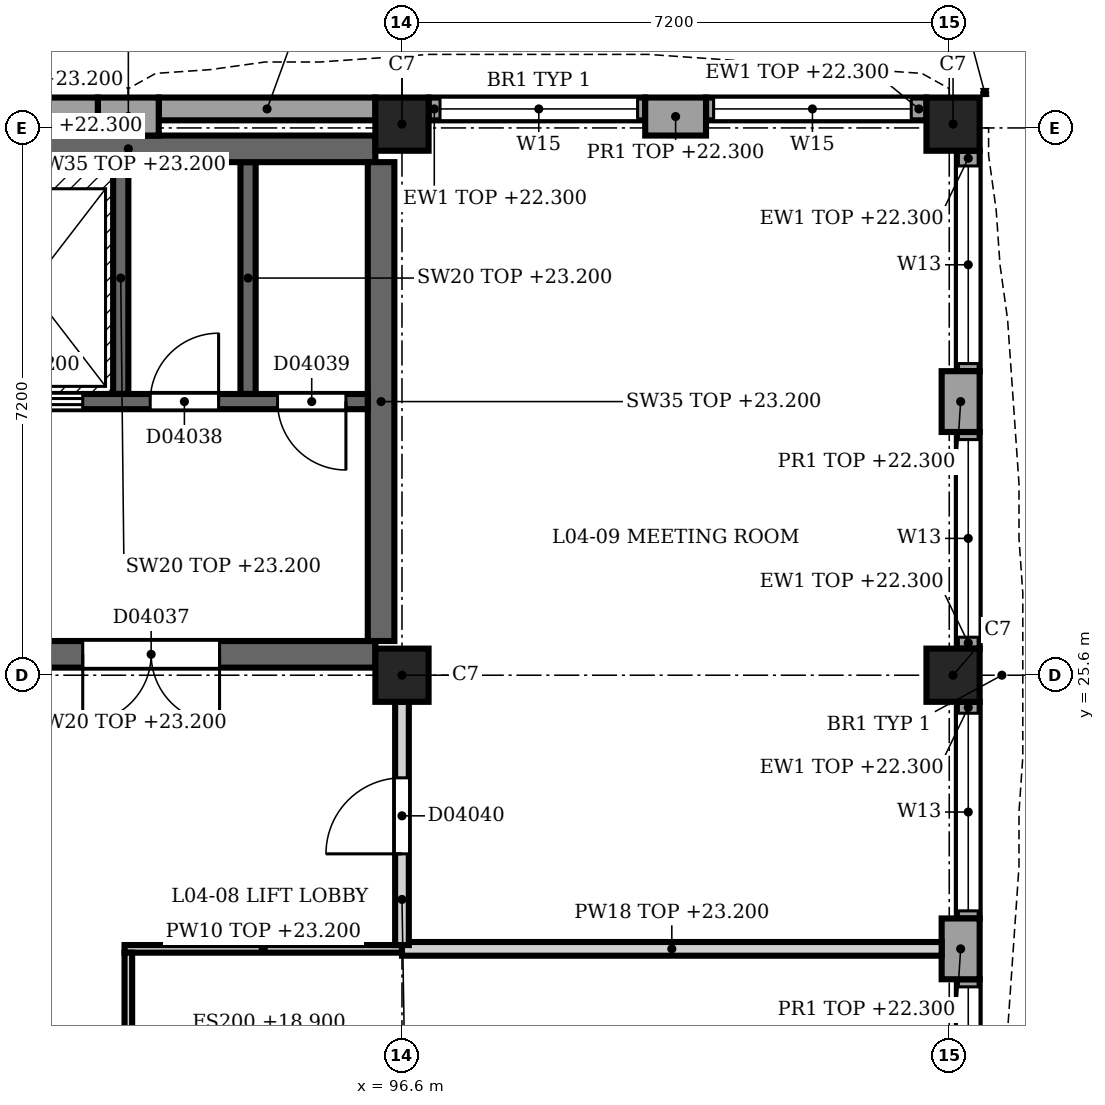
"""IFC4 building model, lengths in metres.
Left out: names, types, materials, properties, quantities, classifications, styles, units other than length and angle.
Written with IfcOpenShell. Run it as: python <this file> out.ifc"""

import sys

from ifc_helpers import new_model, si_unit, direction, frame, frame_2d, origin, origin_2d, place, context, subcontext, project, spatial, rectangle, extrude, element, fill, save


model = new_model("IFC4")
c1 = context("Model", 3, precision=1e-05, world=origin(), true_north=direction((0.0, 1.0)))
c2 = subcontext(c1, "Body", "Model", "MODEL_VIEW")
j1 = project(units=[si_unit("LENGTHUNIT", "METRE"), si_unit("PLANEANGLEUNIT", "RADIAN")], contexts=[c1])
p1 = place(None, origin())
s1 = spatial("IfcSite", under=j1, at=p1, CompositionType="ELEMENT")
p2 = place(p1, origin())
s2 = spatial("IfcBuilding", under=s1, at=p2, CompositionType="ELEMENT")
p3 = place(p2, frame((0.0, 0.0, 18.9)))
s3 = spatial("IfcBuildingStorey", under=s2, at=p3, CompositionType="ELEMENT", Elevation=18.9)
for number, where, z_axis, x_axis in (
    (1, (96.6, 25.6, 0.0), (0.0, 0.0, 1.0), (1.0, 0.0, 0.0)),
    (2, (96.6, 32.85, 0.0), (0.0, 0.0, 1.0), (1.0, 0.0, 0.0)),
    (3, (103.85, 25.6, 0.0), (0.0, 0.0, 1.0), (1.0, 0.0, 0.0)),
    (4, (103.85, 32.85, 0.0), (0.0, 0.0, 1.0), (1.0, 0.0, 0.0)),
):
    element("IfcColumn", number, at=place(p3, frame(where, z_axis=z_axis, x_axis=x_axis)), inside=s3, PredefinedType="COLUMN", context=c2, shape_type="SweptSolid", body=[
        extrude(rectangle(XDim=0.7, YDim=0.7, at=origin_2d()), origin(), (0.0, 0.0, 1.0), 4.5),
    ])
p4 = place(p3, frame((92.6, 32.95, 0.0), z_axis=(0.0, 0.0, 1.0), x_axis=(1.0, 0.0, 0.0)))
e5 = element("IfcWall", 5, at=p4, inside=s3, PredefinedType="SOLIDWALL", context=c2, shape_type="SweptSolid", body=[
    extrude(rectangle(XDim=0.8, YDim=0.5, at=frame_2d((0.4, 0.0))), origin(), (0.0, 0.0, 1.0), 3.4),
])
p5 = place(p3, frame((99.8, 32.95, 0.0), z_axis=(0.0, 0.0, 1.0), x_axis=(1.0, 0.0, 0.0)))
e6 = element("IfcWall", 6, at=p5, inside=s3, PredefinedType="SOLIDWALL", context=c2, shape_type="SweptSolid", body=[
    extrude(rectangle(XDim=0.8, YDim=0.5, at=frame_2d((0.4, 0.0))), origin(), (0.0, 0.0, 1.0), 3.4),
])
for number, where, z_axis, x_axis in (
    (7, (89.75, 33.05, 0.0), (0.0, 0.0, 1.0), (1.0, 0.0, 0.0)),
    (8, (93.4, 33.05, 0.0), (0.0, 0.0, 1.0), (1.0, 0.0, 0.0)),
):
    element("IfcWall", number, at=place(p3, frame(where, z_axis=z_axis, x_axis=x_axis)), inside=s3, PredefinedType="SOLIDWALL", context=c2, shape_type="SweptSolid", body=[
        extrude(rectangle(XDim=2.85, YDim=0.3, at=frame_2d((1.425, 0.0))), origin(), (0.0, 0.0, 1.0), 3.4),
    ])
p6 = place(p3, frame((96.95, 33.05, 0.0), z_axis=(0.0, 0.0, 1.0), x_axis=(1.0, 0.0, 0.0)))
e9 = element("IfcWall", 9, at=p6, inside=s3, PredefinedType="SOLIDWALL", context=c2, shape_type="SweptSolid", body=[
    extrude(rectangle(XDim=2.85, YDim=0.3, at=frame_2d((1.425, 0.0))), origin(), (0.0, 0.0, 1.0), 3.4),
])
p7 = place(p6, frame((0.15, 0.0, 1.0)))
e10 = element("IfcOpeningElement", 10, at=p7, cuts=e9, PredefinedType="OPENING", context=c2, shape_type="SweptSolid", body=[
    extrude(rectangle(XDim=2.6, YDim=2.0, at=frame_2d((1.3, 1.0))), frame((0.0, 0.16, 0.0), z_axis=(0.0, -1.0, 0.0), x_axis=(1.0, 0.0, 0.0)), (0.0, 0.0, 1.0), 0.32),
])
p8 = place(p3, frame((100.6, 33.05, 0.0), z_axis=(0.0, 0.0, 1.0), x_axis=(1.0, 0.0, 0.0)))
e11 = element("IfcWall", 11, at=p8, inside=s3, PredefinedType="SOLIDWALL", context=c2, shape_type="SweptSolid", body=[
    extrude(rectangle(XDim=2.9, YDim=0.3, at=frame_2d((1.45, 0.0))), origin(), (0.0, 0.0, 1.0), 3.4),
])
p9 = place(p8, frame((0.1, 0.0, 1.0)))
e12 = element("IfcOpeningElement", 12, at=p9, cuts=e11, PredefinedType="OPENING", context=c2, shape_type="SweptSolid", body=[
    extrude(rectangle(XDim=2.6, YDim=2.0, at=frame_2d((1.3, 1.0))), frame((0.0, 0.16, 0.0), z_axis=(0.0, -1.0, 0.0), x_axis=(1.0, 0.0, 0.0)), (0.0, 0.0, 1.0), 0.32),
])
p10 = place(p3, frame((103.95, 29.6, 0.0), z_axis=(0.0, 0.0, 1.0), x_axis=(0.0, -1.0, 0.0)))
e13 = element("IfcWall", 13, at=p10, inside=s3, PredefinedType="SOLIDWALL", context=c2, shape_type="SweptSolid", body=[
    extrude(rectangle(XDim=0.8, YDim=0.5, at=frame_2d((0.4, 0.0))), origin(), (0.0, 0.0, 1.0), 3.4),
])
p11 = place(p3, frame((103.95, 22.4, 0.0), z_axis=(0.0, 0.0, 1.0), x_axis=(0.0, -1.0, 0.0)))
e14 = element("IfcWall", 14, at=p11, inside=s3, PredefinedType="SOLIDWALL", context=c2, shape_type="SweptSolid", body=[
    extrude(rectangle(XDim=0.8, YDim=0.5, at=frame_2d((0.4, 0.0))), origin(), (0.0, 0.0, 1.0), 3.4),
])
p12 = place(p3, frame((104.05, 32.5, 0.0), z_axis=(0.0, 0.0, 1.0), x_axis=(0.0, -1.0, 0.0)))
e15 = element("IfcWall", 15, at=p12, inside=s3, PredefinedType="SOLIDWALL", context=c2, shape_type="SweptSolid", body=[
    extrude(rectangle(XDim=2.9, YDim=0.3, at=frame_2d((1.45, 0.0))), origin(), (0.0, 0.0, 1.0), 3.4),
])
p13 = place(p12, frame((0.2, 0.0, 0.9)))
e16 = element("IfcOpeningElement", 16, at=p13, cuts=e15, PredefinedType="OPENING", context=c2, shape_type="SweptSolid", body=[
    extrude(rectangle(XDim=2.6, YDim=2.2, at=frame_2d((1.3, 1.1))), frame((0.0, 0.16, 0.0), z_axis=(0.0, -1.0, 0.0), x_axis=(1.0, 0.0, 0.0)), (0.0, 0.0, 1.0), 0.32),
])
p14 = place(p3, frame((104.05, 28.8, 0.0), z_axis=(0.0, 0.0, 1.0), x_axis=(0.0, -1.0, 0.0)))
e17 = element("IfcWall", 17, at=p14, inside=s3, PredefinedType="SOLIDWALL", context=c2, shape_type="SweptSolid", body=[
    extrude(rectangle(XDim=2.85, YDim=0.3, at=frame_2d((1.425, 0.0))), origin(), (0.0, 0.0, 1.0), 3.4),
])
p15 = place(p14, frame((0.1, 0.0, 0.9)))
e18 = element("IfcOpeningElement", 18, at=p15, cuts=e17, PredefinedType="OPENING", context=c2, shape_type="SweptSolid", body=[
    extrude(rectangle(XDim=2.6, YDim=2.2, at=frame_2d((1.3, 1.1))), frame((0.0, 0.16, 0.0), z_axis=(0.0, -1.0, 0.0), x_axis=(1.0, 0.0, 0.0)), (0.0, 0.0, 1.0), 0.32),
])
p16 = place(p3, frame((104.05, 25.25, 0.0), z_axis=(0.0, 0.0, 1.0), x_axis=(0.0, -1.0, 0.0)))
e19 = element("IfcWall", 19, at=p16, inside=s3, PredefinedType="SOLIDWALL", context=c2, shape_type="SweptSolid", body=[
    extrude(rectangle(XDim=2.85, YDim=0.3, at=frame_2d((1.425, 0.0))), origin(), (0.0, 0.0, 1.0), 3.4),
])
p17 = place(p16, frame((0.15, 0.0, 0.9)))
e20 = element("IfcOpeningElement", 20, at=p17, cuts=e19, PredefinedType="OPENING", context=c2, shape_type="SweptSolid", body=[
    extrude(rectangle(XDim=2.6, YDim=2.2, at=frame_2d((1.3, 1.1))), frame((0.0, 0.16, 0.0), z_axis=(0.0, -1.0, 0.0), x_axis=(1.0, 0.0, 0.0)), (0.0, 0.0, 1.0), 0.32),
])
p18 = place(p3, frame((104.05, 21.6, 0.0), z_axis=(0.0, 0.0, 1.0), x_axis=(0.0, -1.0, 0.0)))
e21 = element("IfcWall", 21, at=p18, inside=s3, PredefinedType="SOLIDWALL", context=c2, shape_type="SweptSolid", body=[
    extrude(rectangle(XDim=2.85, YDim=0.3, at=frame_2d((1.425, 0.0))), origin(), (0.0, 0.0, 1.0), 3.4),
])
p19 = place(p18, frame((0.1, 0.0, 0.9)))
e22 = element("IfcOpeningElement", 22, at=p19, cuts=e21, PredefinedType="OPENING", context=c2, shape_type="SweptSolid", body=[
    extrude(rectangle(XDim=2.6, YDim=2.2, at=frame_2d((1.3, 1.1))), frame((0.0, 0.16, 0.0), z_axis=(0.0, -1.0, 0.0), x_axis=(1.0, 0.0, 0.0)), (0.0, 0.0, 1.0), 0.32),
])
p20 = place(p3, frame((89.75, 25.875, 0.0), z_axis=(0.0, 0.0, 1.0), x_axis=(1.0, 0.0, 0.0)))
e23 = element("IfcWall", 23, at=p20, inside=s3, PredefinedType="SHEAR", context=c2, shape_type="SweptSolid", body=[
    extrude(rectangle(XDim=6.5, YDim=0.35, at=frame_2d((3.25, 0.0))), origin(), (0.0, 0.0, 1.0), 4.3),
])
p21 = place(p20, frame((2.65, 0.0, 0.0)))
e24 = element("IfcOpeningElement", 24, at=p21, cuts=e23, PredefinedType="OPENING", context=c2, shape_type="SweptSolid", body=[
    extrude(rectangle(XDim=1.8, YDim=2.1, at=frame_2d((0.9, 1.05))), frame((0.0, 0.185, 0.0), z_axis=(0.0, -1.0, 0.0), x_axis=(1.0, 0.0, 0.0)), (0.0, 0.0, 1.0), 0.37),
])
p22 = place(p3, frame((89.75, 32.525, 0.0), z_axis=(0.0, 0.0, 1.0), x_axis=(1.0, 0.0, 0.0)))
e25 = element("IfcWall", 25, at=p22, inside=s3, PredefinedType="SHEAR", context=c2, shape_type="SweptSolid", body=[
    extrude(rectangle(XDim=6.5, YDim=0.35, at=frame_2d((3.25, 0.0))), origin(), (0.0, 0.0, 1.0), 4.3),
])
p23 = place(p3, frame((96.325, 26.05, 0.0), z_axis=(0.0, 0.0, 1.0), x_axis=(0.0, 1.0, 0.0)))
e26 = element("IfcWall", 26, at=p23, inside=s3, PredefinedType="SHEAR", context=c2, shape_type="SweptSolid", body=[
    extrude(rectangle(XDim=6.3, YDim=0.35, at=frame_2d((3.15, 0.0))), origin(), (0.0, 0.0, 1.0), 4.3),
])
p24 = place(p3, frame((96.15, 29.2, 0.0), z_axis=(0.0, 0.0, 1.0), x_axis=(-1.0, 0.0, 0.0)))
e27 = element("IfcWall", 27, at=p24, inside=s3, PredefinedType="SHEAR", context=c2, shape_type="SweptSolid", body=[
    extrude(rectangle(XDim=10.35, YDim=0.2, at=frame_2d((5.175, 0.0))), origin(), (0.0, 0.0, 1.0), 4.3),
])
p25 = place(p24, frame((8.8, 0.0, 0.0)))
e28 = element("IfcOpeningElement", 28, at=p25, cuts=e27, PredefinedType="OPENING", context=c2, shape_type="SweptSolid", body=[
    extrude(rectangle(XDim=1.1, YDim=2.1, at=frame_2d((0.55, 1.05))), frame((0.0, 0.11, 0.0), z_axis=(0.0, -1.0, 0.0), x_axis=(1.0, 0.0, 0.0)), (0.0, 0.0, 1.0), 0.22),
])
p26 = place(p24, frame((6.6, 0.0, 0.0)))
e29 = element("IfcOpeningElement", 29, at=p26, cuts=e27, PredefinedType="OPENING", context=c2, shape_type="SweptSolid", body=[
    extrude(rectangle(XDim=1.1, YDim=2.1, at=frame_2d((0.55, 1.05))), frame((0.0, 0.11, 0.0), z_axis=(0.0, -1.0, 0.0), x_axis=(1.0, 0.0, 0.0)), (0.0, 0.0, 1.0), 0.22),
])
p27 = place(p24, frame((3.75, 0.0, 0.0)))
e30 = element("IfcOpeningElement", 30, at=p27, cuts=e27, PredefinedType="OPENING", context=c2, shape_type="SweptSolid", body=[
    extrude(rectangle(XDim=1.4, YDim=2.1, at=frame_2d((0.7, 1.05))), frame((0.0, 0.11, 0.0), z_axis=(0.0, -1.0, 0.0), x_axis=(1.0, 0.0, 0.0)), (0.0, 0.0, 1.0), 0.22),
])
p28 = place(p24, frame((1.962, 0.0, 0.0)))
e31 = element("IfcOpeningElement", 31, at=p28, cuts=e27, PredefinedType="OPENING", context=c2, shape_type="SweptSolid", body=[
    extrude(rectangle(XDim=0.9, YDim=2.1, at=frame_2d((0.45, 1.05))), frame((0.0, 0.11, 0.0), z_axis=(0.0, -1.0, 0.0), x_axis=(1.0, 0.0, 0.0)), (0.0, 0.0, 1.0), 0.22),
])
p29 = place(p24, frame((0.288, 0.0, 0.0)))
e32 = element("IfcOpeningElement", 32, at=p29, cuts=e27, PredefinedType="OPENING", context=c2, shape_type="SweptSolid", body=[
    extrude(rectangle(XDim=0.9, YDim=2.1, at=frame_2d((0.45, 1.05))), frame((0.0, 0.11, 0.0), z_axis=(0.0, -1.0, 0.0), x_axis=(1.0, 0.0, 0.0)), (0.0, 0.0, 1.0), 0.22),
])
for number, where, z_axis, x_axis in (
    (33, (92.9, 29.3, 0.0), (0.0, 0.0, 1.0), (0.0, 1.0, 0.0)),
    (34, (94.575, 29.3, 0.0), (0.0, 0.0, 1.0), (0.0, 1.0, 0.0)),
):
    element("IfcWall", number, at=place(p3, frame(where, z_axis=z_axis, x_axis=x_axis)), inside=s3, PredefinedType="SHEAR", context=c2, shape_type="SweptSolid", body=[
        extrude(rectangle(XDim=3.05, YDim=0.2, at=frame_2d((1.525, 0.0))), origin(), (0.0, 0.0, 1.0), 4.3),
    ])
p30 = place(p3, frame((92.95, 22.0, 0.0), z_axis=(0.0, 0.0, 1.0), x_axis=(1.0, 0.0, 0.0)))
e35 = element("IfcWall", 35, at=p30, inside=s3, PredefinedType="PARTITIONING", context=c2, shape_type="SweptSolid", body=[
    extrude(rectangle(XDim=3.65, YDim=0.1, at=frame_2d((1.825, 0.0))), origin(), (0.0, 0.0, 1.0), 4.3),
])
p31 = place(p3, frame((96.6, 22.0, 0.0), z_axis=(0.0, 0.0, 1.0), x_axis=(1.0, 0.0, 0.0)))
e36 = element("IfcWall", 36, at=p31, inside=s3, PredefinedType="PARTITIONING", context=c2, shape_type="SweptSolid", body=[
    extrude(rectangle(XDim=7.1, YDim=0.18, at=frame_2d((3.55, 0.0))), origin(), (0.0, 0.0, 1.0), 4.3),
])
p32 = place(p3, frame((93.0, 21.95, 0.0), z_axis=(0.0, 0.0, 1.0), x_axis=(0.0, -1.0, 0.0)))
e37 = element("IfcWall", 37, at=p32, inside=s3, PredefinedType="PARTITIONING", context=c2, shape_type="SweptSolid", body=[
    extrude(rectangle(XDim=7.08, YDim=0.1, at=frame_2d((3.54, 0.0))), origin(), (0.0, 0.0, 1.0), 3.82),
])
p33 = place(p32, frame((3.1, 0.0, 0.0)))
e38 = element("IfcOpeningElement", 38, at=p33, cuts=e37, PredefinedType="OPENING", context=c2, shape_type="SweptSolid", body=[
    extrude(rectangle(XDim=1.0, YDim=2.1, at=frame_2d((0.5, 1.05))), frame((0.0, 0.06, 0.0), z_axis=(0.0, -1.0, 0.0), x_axis=(1.0, 0.0, 0.0)), (0.0, 0.0, 1.0), 0.12),
])
p34 = place(p3, frame((96.6, 25.25, 0.0), z_axis=(0.0, 0.0, 1.0), x_axis=(0.0, -1.0, 0.0)))
e39 = element("IfcWall", 39, at=p34, inside=s3, PredefinedType="PARTITIONING", context=c2, shape_type="SweptSolid", body=[
    extrude(rectangle(XDim=3.2, YDim=0.18, at=frame_2d((1.6, 0.0))), origin(), (0.0, 0.0, 1.0), 3.47),
])
p35 = place(p34, frame((1.0, 0.0, 0.0)))
e40 = element("IfcOpeningElement", 40, at=p35, cuts=e39, PredefinedType="OPENING", context=c2, shape_type="SweptSolid", body=[
    extrude(rectangle(XDim=1.0, YDim=2.1, at=frame_2d((0.5, 1.05))), frame((0.0, 0.1, 0.0), z_axis=(0.0, -1.0, 0.0), x_axis=(1.0, 0.0, 0.0)), (0.0, 0.0, 1.0), 0.2),
])
p36 = place(p7, origin())
e41 = element("IfcWindow", 41, at=p36, inside=s3, PartitioningType="SINGLE_PANEL", PredefinedType="WINDOW", context=c2, shape_type="SweptSolid", body=[
    extrude(rectangle(XDim=2.6, YDim=2.0, at=frame_2d((1.3, 1.0))), frame((0.0, 0.03, 0.0), z_axis=(0.0, -1.0, 0.0), x_axis=(1.0, 0.0, 0.0)), (0.0, 0.0, 1.0), 0.06),
])
fill(e10, e41)
p37 = place(p9, origin())
e42 = element("IfcWindow", 42, at=p37, inside=s3, PartitioningType="SINGLE_PANEL", PredefinedType="WINDOW", context=c2, shape_type="SweptSolid", body=[
    extrude(rectangle(XDim=2.6, YDim=2.0, at=frame_2d((1.3, 1.0))), frame((0.0, 0.03, 0.0), z_axis=(0.0, -1.0, 0.0), x_axis=(1.0, 0.0, 0.0)), (0.0, 0.0, 1.0), 0.06),
])
fill(e12, e42)
p38 = place(p13, origin())
e43 = element("IfcWindow", 43, at=p38, inside=s3, PartitioningType="SINGLE_PANEL", PredefinedType="WINDOW", context=c2, shape_type="SweptSolid", body=[
    extrude(rectangle(XDim=2.6, YDim=2.2, at=frame_2d((1.3, 1.1))), frame((0.0, 0.03, 0.0), z_axis=(0.0, -1.0, 0.0), x_axis=(1.0, 0.0, 0.0)), (0.0, 0.0, 1.0), 0.06),
])
fill(e16, e43)
p39 = place(p15, origin())
e44 = element("IfcWindow", 44, at=p39, inside=s3, PartitioningType="SINGLE_PANEL", PredefinedType="WINDOW", context=c2, shape_type="SweptSolid", body=[
    extrude(rectangle(XDim=2.6, YDim=2.2, at=frame_2d((1.3, 1.1))), frame((0.0, 0.03, 0.0), z_axis=(0.0, -1.0, 0.0), x_axis=(1.0, 0.0, 0.0)), (0.0, 0.0, 1.0), 0.06),
])
fill(e18, e44)
p40 = place(p17, origin())
e45 = element("IfcWindow", 45, at=p40, inside=s3, PartitioningType="SINGLE_PANEL", PredefinedType="WINDOW", context=c2, shape_type="SweptSolid", body=[
    extrude(rectangle(XDim=2.6, YDim=2.2, at=frame_2d((1.3, 1.1))), frame((0.0, 0.03, 0.0), z_axis=(0.0, -1.0, 0.0), x_axis=(1.0, 0.0, 0.0)), (0.0, 0.0, 1.0), 0.06),
])
fill(e20, e45)
p41 = place(p19, origin())
e46 = element("IfcWindow", 46, at=p41, inside=s3, PartitioningType="SINGLE_PANEL", PredefinedType="WINDOW", context=c2, shape_type="SweptSolid", body=[
    extrude(rectangle(XDim=2.6, YDim=2.2, at=frame_2d((1.3, 1.1))), frame((0.0, 0.03, 0.0), z_axis=(0.0, -1.0, 0.0), x_axis=(1.0, 0.0, 0.0)), (0.0, 0.0, 1.0), 0.06),
])
fill(e22, e46)
p42 = place(p21, origin())
e47 = element("IfcDoor", 47, at=p42, inside=s3, OperationType="SINGLE_SWING_LEFT", PredefinedType="DOOR", context=c2, shape_type="SweptSolid", body=[
    extrude(rectangle(XDim=1.8, YDim=2.1, at=frame_2d((0.9, 1.05))), frame((0.0, 0.025, 0.0), z_axis=(0.0, -1.0, 0.0), x_axis=(1.0, 0.0, 0.0)), (0.0, 0.0, 1.0), 0.05),
])
fill(e24, e47)
p43 = place(p27, origin())
e48 = element("IfcDoor", 48, at=p43, inside=s3, OperationType="DOUBLE_DOOR_SLIDING", PredefinedType="DOOR", context=c2, shape_type="SweptSolid", body=[
    extrude(rectangle(XDim=1.4, YDim=2.1, at=frame_2d((0.7, 1.05))), frame((0.0, 0.025, 0.0), z_axis=(0.0, -1.0, 0.0), x_axis=(1.0, 0.0, 0.0)), (0.0, 0.0, 1.0), 0.05),
])
fill(e30, e48)
p44 = place(p28, origin())
e49 = element("IfcDoor", 49, at=p44, inside=s3, OperationType="SINGLE_SWING_LEFT", PredefinedType="DOOR", context=c2, shape_type="SweptSolid", body=[
    extrude(rectangle(XDim=0.9, YDim=2.1, at=frame_2d((0.45, 1.05))), frame((0.0, 0.025, 0.0), z_axis=(0.0, -1.0, 0.0), x_axis=(1.0, 0.0, 0.0)), (0.0, 0.0, 1.0), 0.05),
])
fill(e31, e49)
p45 = place(p29, origin())
e50 = element("IfcDoor", 50, at=p45, inside=s3, OperationType="SINGLE_SWING_LEFT", PredefinedType="DOOR", context=c2, shape_type="SweptSolid", body=[
    extrude(rectangle(XDim=0.9, YDim=2.1, at=frame_2d((0.45, 1.05))), frame((0.0, 0.025, 0.0), z_axis=(0.0, -1.0, 0.0), x_axis=(1.0, 0.0, 0.0)), (0.0, 0.0, 1.0), 0.05),
])
fill(e32, e50)
p46 = place(p35, origin())
e51 = element("IfcDoor", 51, at=p46, inside=s3, OperationType="SINGLE_SWING_LEFT", PredefinedType="DOOR", context=c2, shape_type="SweptSolid", body=[
    extrude(rectangle(XDim=1.0, YDim=2.1, at=frame_2d((0.5, 1.05))), frame((0.0, 0.025, 0.0), z_axis=(0.0, -1.0, 0.0), x_axis=(1.0, 0.0, 0.0)), (0.0, 0.0, 1.0), 0.05),
])
fill(e40, e51)
save(model, sys.argv[1])
